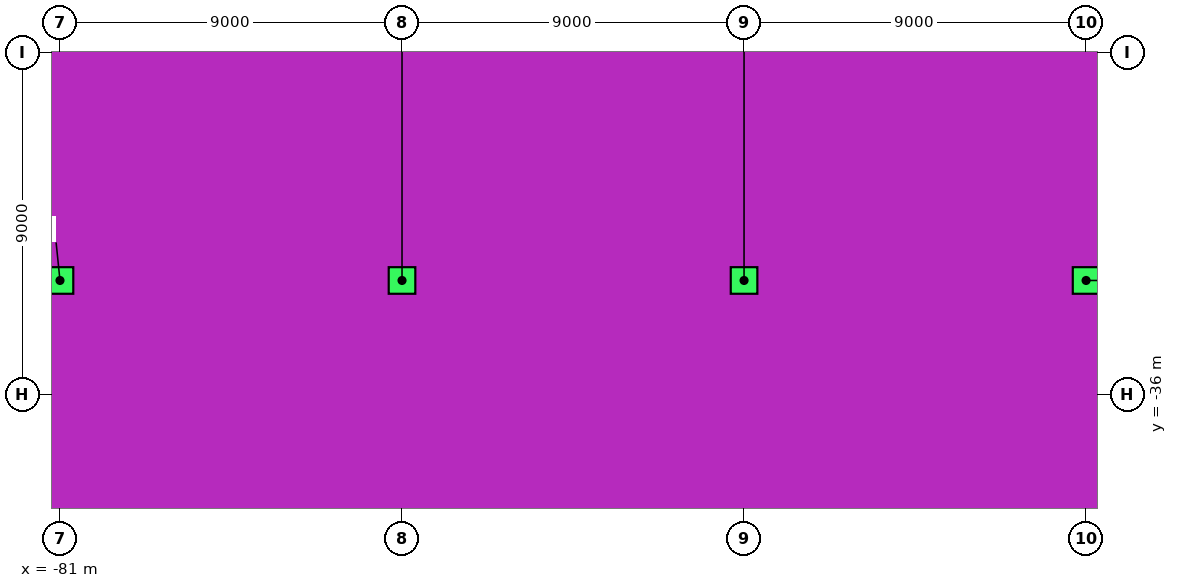
"""IFC4 building model, lengths in metres.
Left out: names, types, materials, properties, quantities, classifications, styles, units other than length and angle.
Written with IfcOpenShell. Run it as: python <this file> out.ifc"""

import sys

from ifc_helpers import new_model, si_unit, direction, frame, origin, origin_2d, place, context, subcontext, project, spatial, rectangle, extrude, element, save


model = new_model("IFC4")
c1 = context("Model", 3, precision=1e-05, world=origin(), true_north=direction((0.0, 1.0)))
c2 = subcontext(c1, "Body", "Model", "MODEL_VIEW")
j1 = project(units=[si_unit("LENGTHUNIT", "METRE"), si_unit("PLANEANGLEUNIT", "RADIAN")], contexts=[c1])
p1 = place(None, origin())
s1 = spatial("IfcSite", under=j1, at=p1, CompositionType="ELEMENT")
p2 = place(p1, origin())
s2 = spatial("IfcBuilding", under=s1, at=p2, CompositionType="ELEMENT")
p3 = place(p2, frame((0.0, 0.0, -4.5)))
s3 = spatial("IfcBuildingStorey", under=s2, at=p3, CompositionType="ELEMENT", Elevation=-4.5)
for number, where, z_axis, x_axis in (
    (1, (-81.0, -33.0, 0.0), (0.0, 0.0, 1.0), (1.0, 0.0, 0.0)),
    (2, (-72.0, -33.0, 0.0), (0.0, 0.0, 1.0), (1.0, 0.0, 0.0)),
    (3, (-63.0, -33.0, 0.0), (0.0, 0.0, 1.0), (1.0, 0.0, 0.0)),
    (4, (-54.0, -33.0, 0.0), (0.0, 0.0, 1.0), (1.0, 0.0, 0.0)),
):
    element("IfcColumn", number, at=place(p3, frame(where, z_axis=z_axis, x_axis=x_axis)), inside=s3, PredefinedType="COLUMN", context=c2, shape_type="SweptSolid", body=[
        extrude(rectangle(XDim=0.7, YDim=0.7, at=origin_2d()), origin(), (0.0, 0.0, 1.0), 4.0),
    ])
save(model, sys.argv[1])
